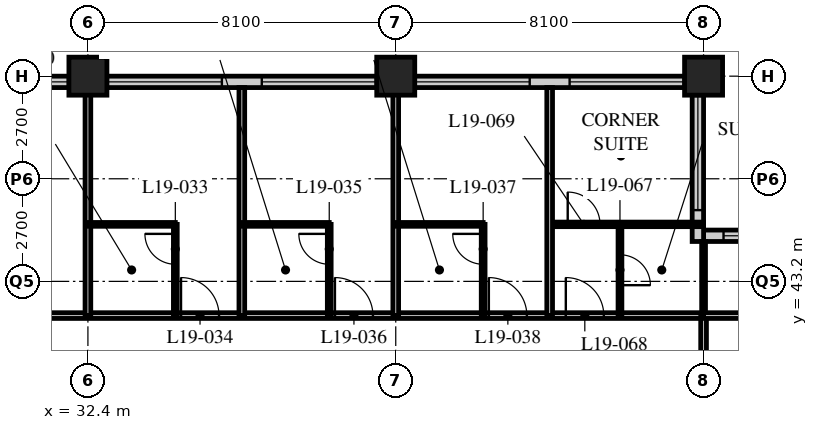
"""IFC4 building model, lengths in metres.
Left out: names, types, materials, properties, quantities, classifications, styles, units other than length and angle.
Written with IfcOpenShell. Run it as: python <this file> out.ifc"""

import sys

from ifc_helpers import new_model, si_unit, direction, frame, frame_2d, origin, origin_2d, place, context, subcontext, project, spatial, rectangle, hollow_rectangle, extrude, element, fill, save


model = new_model("IFC4")
c1 = context("Model", 3, precision=1e-05, world=origin(), true_north=direction((0.0, 1.0)))
c2 = subcontext(c1, "Body", "Model", "MODEL_VIEW")
j1 = project(units=[si_unit("LENGTHUNIT", "METRE"), si_unit("PLANEANGLEUNIT", "RADIAN")], contexts=[c1])
p1 = place(None, origin())
s1 = spatial("IfcSite", under=j1, at=p1, CompositionType="ELEMENT")
p2 = place(p1, origin())
s2 = spatial("IfcBuilding", under=s1, at=p2, CompositionType="ELEMENT")
p3 = place(p2, frame((0.0, 0.0, 77.2)))
s3 = spatial("IfcBuildingStorey", under=s2, at=p3, CompositionType="ELEMENT", Elevation=77.2)
for number, where, z_axis, x_axis in (
    (1, (32.4, 48.6, 0.0), (0.0, 0.0, 1.0), (1.0, 0.0, 0.0)),
    (2, (40.5, 48.6, 0.0), (0.0, 0.0, 1.0), (1.0, 0.0, 0.0)),
    (3, (48.6, 48.6, 0.0), (0.0, 0.0, 1.0), (1.0, 0.0, 0.0)),
):
    element("IfcColumn", number, at=place(p3, frame(where, z_axis=z_axis, x_axis=x_axis)), inside=s3, PredefinedType="COLUMN", context=c2, shape_type="SweptSolid", body=[
        extrude(hollow_rectangle(XDim=1.0, YDim=1.0, WallThickness=0.1, at=origin_2d()), origin(), (0.0, 0.0, 1.0), 3.4),
    ])
p4 = place(p3, frame((52.35, 44.4, 0.0), z_axis=(0.0, 0.0, 1.0), x_axis=(-1.0, 0.0, 0.0)))
e4 = element("IfcWall", 4, at=p4, inside=s3, PredefinedType="SOLIDWALL", context=c2, shape_type="SweptSolid", body=[
    extrude(rectangle(XDim=3.75, YDim=0.3, at=frame_2d((1.875, 0.0))), origin(), (0.0, 0.0, 1.0), 3.19),
])
p5 = place(p4, frame((0.225, 0.0, 0.9)))
e5 = element("IfcOpeningElement", 5, at=p5, cuts=e4, PredefinedType="OPENING", context=c2, shape_type="SweptSolid", body=[
    extrude(rectangle(XDim=3.0, YDim=1.5, at=frame_2d((1.5, 0.75))), frame((0.0, 0.16, 0.0), z_axis=(0.0, -1.0, 0.0), x_axis=(1.0, 0.0, 0.0)), (0.0, 0.0, 1.0), 0.32),
])
p6 = place(p3, frame((48.45, 44.25, 0.0), z_axis=(0.0, 0.0, 1.0), x_axis=(0.0, 1.0, 0.0)))
e6 = element("IfcWall", 6, at=p6, inside=s3, PredefinedType="SOLIDWALL", context=c2, shape_type="SweptSolid", body=[
    extrude(rectangle(XDim=4.35, YDim=0.3, at=frame_2d((2.175, 0.0))), origin(), (0.0, 0.0, 1.0), 3.19),
])
p7 = place(p6, frame((0.825, 0.0, 0.9)))
e7 = element("IfcOpeningElement", 7, at=p7, cuts=e6, PredefinedType="OPENING", context=c2, shape_type="SweptSolid", body=[
    extrude(rectangle(XDim=3.0, YDim=1.5, at=frame_2d((1.5, 0.75))), frame((0.0, 0.16, 0.0), z_axis=(0.0, -1.0, 0.0), x_axis=(1.0, 0.0, 0.0)), (0.0, 0.0, 1.0), 0.32),
])
p8 = place(p3, frame((48.3, 48.45, 0.0), z_axis=(0.0, 0.0, 1.0), x_axis=(-1.0, 0.0, 0.0)))
e8 = element("IfcWall", 8, at=p8, inside=s3, PredefinedType="SOLIDWALL", context=c2, shape_type="SweptSolid", body=[
    extrude(rectangle(XDim=40.2, YDim=0.3, at=frame_2d((20.1, 0.0))), origin(), (0.0, 0.0, 1.0), 3.19),
])
p9 = place(p8, frame((0.225, 0.0, 0.9)))
e9 = element("IfcOpeningElement", 9, at=p9, cuts=e8, PredefinedType="OPENING", context=c2, shape_type="SweptSolid", body=[
    extrude(rectangle(XDim=3.0, YDim=1.5, at=frame_2d((1.5, 0.75))), frame((0.0, 0.16, 0.0), z_axis=(0.0, -1.0, 0.0), x_axis=(1.0, 0.0, 0.0)), (0.0, 0.0, 1.0), 0.32),
])
p10 = place(p8, frame((4.275, 0.0, 0.9)))
e10 = element("IfcOpeningElement", 10, at=p10, cuts=e8, PredefinedType="OPENING", context=c2, shape_type="SweptSolid", body=[
    extrude(rectangle(XDim=3.0, YDim=1.5, at=frame_2d((1.5, 0.75))), frame((0.0, 0.16, 0.0), z_axis=(0.0, -1.0, 0.0), x_axis=(1.0, 0.0, 0.0)), (0.0, 0.0, 1.0), 0.32),
])
p11 = place(p8, frame((8.325, 0.0, 0.9)))
e11 = element("IfcOpeningElement", 11, at=p11, cuts=e8, PredefinedType="OPENING", context=c2, shape_type="SweptSolid", body=[
    extrude(rectangle(XDim=3.0, YDim=1.5, at=frame_2d((1.5, 0.75))), frame((0.0, 0.16, 0.0), z_axis=(0.0, -1.0, 0.0), x_axis=(1.0, 0.0, 0.0)), (0.0, 0.0, 1.0), 0.32),
])
p12 = place(p8, frame((12.375, 0.0, 0.9)))
e12 = element("IfcOpeningElement", 12, at=p12, cuts=e8, PredefinedType="OPENING", context=c2, shape_type="SweptSolid", body=[
    extrude(rectangle(XDim=3.0, YDim=1.5, at=frame_2d((1.5, 0.75))), frame((0.0, 0.16, 0.0), z_axis=(0.0, -1.0, 0.0), x_axis=(1.0, 0.0, 0.0)), (0.0, 0.0, 1.0), 0.32),
])
p13 = place(p8, frame((16.425, 0.0, 0.9)))
e13 = element("IfcOpeningElement", 13, at=p13, cuts=e8, PredefinedType="OPENING", context=c2, shape_type="SweptSolid", body=[
    extrude(rectangle(XDim=3.0, YDim=1.5, at=frame_2d((1.5, 0.75))), frame((0.0, 0.16, 0.0), z_axis=(0.0, -1.0, 0.0), x_axis=(1.0, 0.0, 0.0)), (0.0, 0.0, 1.0), 0.32),
])
p14 = place(p8, frame((20.475, 0.0, 0.9)))
e14 = element("IfcOpeningElement", 14, at=p14, cuts=e8, PredefinedType="OPENING", context=c2, shape_type="SweptSolid", body=[
    extrude(rectangle(XDim=3.0, YDim=1.5, at=frame_2d((1.5, 0.75))), frame((0.0, 0.16, 0.0), z_axis=(0.0, -1.0, 0.0), x_axis=(1.0, 0.0, 0.0)), (0.0, 0.0, 1.0), 0.32),
])
p15 = place(p8, frame((24.525, 0.0, 0.9)))
e15 = element("IfcOpeningElement", 15, at=p15, cuts=e8, PredefinedType="OPENING", context=c2, shape_type="SweptSolid", body=[
    extrude(rectangle(XDim=3.0, YDim=1.5, at=frame_2d((1.5, 0.75))), frame((0.0, 0.16, 0.0), z_axis=(0.0, -1.0, 0.0), x_axis=(1.0, 0.0, 0.0)), (0.0, 0.0, 1.0), 0.32),
])
p16 = place(p8, frame((28.575, 0.0, 0.9)))
e16 = element("IfcOpeningElement", 16, at=p16, cuts=e8, PredefinedType="OPENING", context=c2, shape_type="SweptSolid", body=[
    extrude(rectangle(XDim=3.0, YDim=1.5, at=frame_2d((1.5, 0.75))), frame((0.0, 0.16, 0.0), z_axis=(0.0, -1.0, 0.0), x_axis=(1.0, 0.0, 0.0)), (0.0, 0.0, 1.0), 0.32),
])
p17 = place(p8, frame((32.625, 0.0, 0.9)))
e17 = element("IfcOpeningElement", 17, at=p17, cuts=e8, PredefinedType="OPENING", context=c2, shape_type="SweptSolid", body=[
    extrude(rectangle(XDim=3.0, YDim=1.5, at=frame_2d((1.5, 0.75))), frame((0.0, 0.16, 0.0), z_axis=(0.0, -1.0, 0.0), x_axis=(1.0, 0.0, 0.0)), (0.0, 0.0, 1.0), 0.32),
])
p18 = place(p8, frame((36.675, 0.0, 0.9)))
e18 = element("IfcOpeningElement", 18, at=p18, cuts=e8, PredefinedType="OPENING", context=c2, shape_type="SweptSolid", body=[
    extrude(rectangle(XDim=3.0, YDim=1.5, at=frame_2d((1.5, 0.75))), frame((0.0, 0.16, 0.0), z_axis=(0.0, -1.0, 0.0), x_axis=(1.0, 0.0, 0.0)), (0.0, 0.0, 1.0), 0.32),
])
p19 = place(p3, frame((12.15, 42.3, 0.0), z_axis=(0.0, 0.0, 1.0), x_axis=(1.0, 0.0, 0.0)))
e19 = element("IfcWall", 19, at=p19, inside=s3, PredefinedType="PARTITIONING", context=c2, shape_type="SweptSolid", body=[
    extrude(rectangle(XDim=36.45, YDim=0.15, at=frame_2d((18.225, 0.0))), origin(), (0.0, 0.0, 1.0), 3.19),
])
p20 = place(p19, frame((9.5, 0.0, 0.0)))
e20 = element("IfcOpeningElement", 20, at=p20, cuts=e19, PredefinedType="OPENING", context=c2, shape_type="SweptSolid", body=[
    extrude(rectangle(XDim=1.0, YDim=2.1, at=frame_2d((0.5, 1.05))), frame((0.0, 0.085, 0.0), z_axis=(0.0, -1.0, 0.0), x_axis=(1.0, 0.0, 0.0)), (0.0, 0.0, 1.0), 0.17),
])
p21 = place(p19, frame((17.6, 0.0, 0.0)))
e21 = element("IfcOpeningElement", 21, at=p21, cuts=e19, PredefinedType="OPENING", context=c2, shape_type="SweptSolid", body=[
    extrude(rectangle(XDim=1.0, YDim=2.1, at=frame_2d((0.5, 1.05))), frame((0.0, 0.085, 0.0), z_axis=(0.0, -1.0, 0.0), x_axis=(1.0, 0.0, 0.0)), (0.0, 0.0, 1.0), 0.17),
])
p22 = place(p19, frame((22.7, 0.0, 0.0)))
e22 = element("IfcOpeningElement", 22, at=p22, cuts=e19, PredefinedType="OPENING", context=c2, shape_type="SweptSolid", body=[
    extrude(rectangle(XDim=1.0, YDim=2.1, at=frame_2d((0.5, 1.05))), frame((0.0, 0.085, 0.0), z_axis=(0.0, -1.0, 0.0), x_axis=(1.0, 0.0, 0.0)), (0.0, 0.0, 1.0), 0.17),
])
p23 = place(p19, frame((26.75, 0.0, 0.0)))
e23 = element("IfcOpeningElement", 23, at=p23, cuts=e19, PredefinedType="OPENING", context=c2, shape_type="SweptSolid", body=[
    extrude(rectangle(XDim=1.0, YDim=2.1, at=frame_2d((0.5, 1.05))), frame((0.0, 0.085, 0.0), z_axis=(0.0, -1.0, 0.0), x_axis=(1.0, 0.0, 0.0)), (0.0, 0.0, 1.0), 0.17),
])
p24 = place(p19, frame((30.8, 0.0, 0.0)))
e24 = element("IfcOpeningElement", 24, at=p24, cuts=e19, PredefinedType="OPENING", context=c2, shape_type="SweptSolid", body=[
    extrude(rectangle(XDim=1.0, YDim=2.1, at=frame_2d((0.5, 1.05))), frame((0.0, 0.085, 0.0), z_axis=(0.0, -1.0, 0.0), x_axis=(1.0, 0.0, 0.0)), (0.0, 0.0, 1.0), 0.17),
])
p25 = place(p19, frame((32.825, 0.0, 0.0)))
e25 = element("IfcOpeningElement", 25, at=p25, cuts=e19, PredefinedType="OPENING", context=c2, shape_type="SweptSolid", body=[
    extrude(rectangle(XDim=1.0, YDim=2.1, at=frame_2d((0.5, 1.05))), frame((0.0, 0.085, 0.0), z_axis=(0.0, -1.0, 0.0), x_axis=(1.0, 0.0, 0.0)), (0.0, 0.0, 1.0), 0.17),
])
p26 = place(p19, frame((2.625, 0.0, 0.0)))
e26 = element("IfcOpeningElement", 26, at=p26, cuts=e19, PredefinedType="OPENING", context=c2, shape_type="SweptSolid", body=[
    extrude(rectangle(XDim=1.0, YDim=2.1, at=frame_2d((0.5, 1.05))), frame((0.0, 0.085, 0.0), z_axis=(0.0, -1.0, 0.0), x_axis=(1.0, 0.0, 0.0)), (0.0, 0.0, 1.0), 0.17),
])
p27 = place(p3, frame((48.6, 16.2, 0.0), z_axis=(0.0, 0.0, 1.0), x_axis=(0.0, 1.0, 0.0)))
e27 = element("IfcWall", 27, at=p27, inside=s3, PredefinedType="PARTITIONING", context=c2, shape_type="SweptSolid", body=[
    extrude(rectangle(XDim=26.1, YDim=0.15, at=frame_2d((13.05, 0.0))), origin(), (0.0, 0.0, 1.0), 2.428),
])
p28 = place(p27, frame((2.75, 0.0, 0.0)))
e28 = element("IfcOpeningElement", 28, at=p28, cuts=e27, PredefinedType="OPENING", context=c2, shape_type="SweptSolid", body=[
    extrude(rectangle(XDim=1.0, YDim=2.1, at=frame_2d((0.5, 1.05))), frame((0.0, 0.085, 0.0), z_axis=(0.0, -1.0, 0.0), x_axis=(1.0, 0.0, 0.0)), (0.0, 0.0, 1.0), 0.17),
])
p29 = place(p27, frame((4.65, 0.0, 0.0)))
e29 = element("IfcOpeningElement", 29, at=p29, cuts=e27, PredefinedType="OPENING", context=c2, shape_type="SweptSolid", body=[
    extrude(rectangle(XDim=1.0, YDim=2.1, at=frame_2d((0.5, 1.05))), frame((0.0, 0.085, 0.0), z_axis=(0.0, -1.0, 0.0), x_axis=(1.0, 0.0, 0.0)), (0.0, 0.0, 1.0), 0.17),
])
p30 = place(p27, frame((13.55, 0.0, 0.0)))
e30 = element("IfcOpeningElement", 30, at=p30, cuts=e27, PredefinedType="OPENING", context=c2, shape_type="SweptSolid", body=[
    extrude(rectangle(XDim=1.0, YDim=2.1, at=frame_2d((0.5, 1.05))), frame((0.0, 0.085, 0.0), z_axis=(0.0, -1.0, 0.0), x_axis=(1.0, 0.0, 0.0)), (0.0, 0.0, 1.0), 0.17),
])
p31 = place(p27, frame((21.65, 0.0, 0.0)))
e31 = element("IfcOpeningElement", 31, at=p31, cuts=e27, PredefinedType="OPENING", context=c2, shape_type="SweptSolid", body=[
    extrude(rectangle(XDim=1.0, YDim=2.1, at=frame_2d((0.5, 1.05))), frame((0.0, 0.085, 0.0), z_axis=(0.0, -1.0, 0.0), x_axis=(1.0, 0.0, 0.0)), (0.0, 0.0, 1.0), 0.17),
])
p32 = place(p3, frame((32.4, 42.3, 0.0), z_axis=(0.0, 0.0, 1.0), x_axis=(0.0, 1.0, 0.0)))
e32 = element("IfcWall", 32, at=p32, inside=s3, PredefinedType="PARTITIONING", context=c2, shape_type="SweptSolid", body=[
    extrude(rectangle(XDim=6.0, YDim=0.15, at=frame_2d((3.0, 0.0))), origin(), (0.0, 0.0, 1.0), 2.428),
])
p33 = place(p3, frame((32.4, 44.7, 0.0), z_axis=(0.0, 0.0, 1.0), x_axis=(1.0, 0.0, 0.0)))
e33 = element("IfcWall", 33, at=p33, inside=s3, PredefinedType="PARTITIONING", context=c2, shape_type="SweptSolid", body=[
    extrude(rectangle(XDim=2.3, YDim=0.1, at=frame_2d((1.15, 0.0))), origin(), (0.0, 0.0, 1.0), 3.19),
])
p34 = place(p3, frame((34.7, 42.3, 0.0), z_axis=(0.0, 0.0, 1.0), x_axis=(0.0, 1.0, 0.0)))
e34 = element("IfcWall", 34, at=p34, inside=s3, PredefinedType="PARTITIONING", context=c2, shape_type="SweptSolid", body=[
    extrude(rectangle(XDim=2.4, YDim=0.1, at=frame_2d((1.2, 0.0))), origin(), (0.0, 0.0, 1.0), 3.19),
])
p35 = place(p34, frame((1.35, 0.0, 0.0)))
e35 = element("IfcOpeningElement", 35, at=p35, cuts=e34, PredefinedType="OPENING", context=c2, shape_type="SweptSolid", body=[
    extrude(rectangle(XDim=0.8, YDim=2.1, at=frame_2d((0.4, 1.05))), frame((0.0, 0.06, 0.0), z_axis=(0.0, -1.0, 0.0), x_axis=(1.0, 0.0, 0.0)), (0.0, 0.0, 1.0), 0.12),
])
p36 = place(p3, frame((36.45, 42.3, 0.0), z_axis=(0.0, 0.0, 1.0), x_axis=(0.0, 1.0, 0.0)))
e36 = element("IfcWall", 36, at=p36, inside=s3, PredefinedType="PARTITIONING", context=c2, shape_type="SweptSolid", body=[
    extrude(rectangle(XDim=6.0, YDim=0.15, at=frame_2d((3.0, 0.0))), origin(), (0.0, 0.0, 1.0), 3.19),
])
p37 = place(p3, frame((36.45, 44.7, 0.0), z_axis=(0.0, 0.0, 1.0), x_axis=(1.0, 0.0, 0.0)))
e37 = element("IfcWall", 37, at=p37, inside=s3, PredefinedType="PARTITIONING", context=c2, shape_type="SweptSolid", body=[
    extrude(rectangle(XDim=2.3, YDim=0.1, at=frame_2d((1.15, 0.0))), origin(), (0.0, 0.0, 1.0), 3.19),
])
p38 = place(p3, frame((38.75, 42.3, 0.0), z_axis=(0.0, 0.0, 1.0), x_axis=(0.0, 1.0, 0.0)))
e38 = element("IfcWall", 38, at=p38, inside=s3, PredefinedType="PARTITIONING", context=c2, shape_type="SweptSolid", body=[
    extrude(rectangle(XDim=2.4, YDim=0.1, at=frame_2d((1.2, 0.0))), origin(), (0.0, 0.0, 1.0), 3.19),
])
p39 = place(p38, frame((1.35, 0.0, 0.0)))
e39 = element("IfcOpeningElement", 39, at=p39, cuts=e38, PredefinedType="OPENING", context=c2, shape_type="SweptSolid", body=[
    extrude(rectangle(XDim=0.8, YDim=2.1, at=frame_2d((0.4, 1.05))), frame((0.0, 0.06, 0.0), z_axis=(0.0, -1.0, 0.0), x_axis=(1.0, 0.0, 0.0)), (0.0, 0.0, 1.0), 0.12),
])
p40 = place(p3, frame((40.5, 42.3, 0.0), z_axis=(0.0, 0.0, 1.0), x_axis=(0.0, 1.0, 0.0)))
e40 = element("IfcWall", 40, at=p40, inside=s3, PredefinedType="PARTITIONING", context=c2, shape_type="SweptSolid", body=[
    extrude(rectangle(XDim=6.0, YDim=0.15, at=frame_2d((3.0, 0.0))), origin(), (0.0, 0.0, 1.0), 2.428),
])
p41 = place(p3, frame((40.5, 44.7, 0.0), z_axis=(0.0, 0.0, 1.0), x_axis=(1.0, 0.0, 0.0)))
e41 = element("IfcWall", 41, at=p41, inside=s3, PredefinedType="PARTITIONING", context=c2, shape_type="SweptSolid", body=[
    extrude(rectangle(XDim=2.3, YDim=0.1, at=frame_2d((1.15, 0.0))), origin(), (0.0, 0.0, 1.0), 3.19),
])
p42 = place(p3, frame((42.8, 42.3, 0.0), z_axis=(0.0, 0.0, 1.0), x_axis=(0.0, 1.0, 0.0)))
e42 = element("IfcWall", 42, at=p42, inside=s3, PredefinedType="PARTITIONING", context=c2, shape_type="SweptSolid", body=[
    extrude(rectangle(XDim=2.4, YDim=0.1, at=frame_2d((1.2, 0.0))), origin(), (0.0, 0.0, 1.0), 3.19),
])
p43 = place(p42, frame((1.35, 0.0, 0.0)))
e43 = element("IfcOpeningElement", 43, at=p43, cuts=e42, PredefinedType="OPENING", context=c2, shape_type="SweptSolid", body=[
    extrude(rectangle(XDim=0.8, YDim=2.1, at=frame_2d((0.4, 1.05))), frame((0.0, 0.06, 0.0), z_axis=(0.0, -1.0, 0.0), x_axis=(1.0, 0.0, 0.0)), (0.0, 0.0, 1.0), 0.12),
])
p44 = place(p3, frame((44.55, 44.7, 0.0), z_axis=(0.0, 0.0, 1.0), x_axis=(1.0, 0.0, 0.0)))
e44 = element("IfcWall", 44, at=p44, inside=s3, PredefinedType="PARTITIONING", context=c2, shape_type="SweptSolid", body=[
    extrude(rectangle(XDim=4.05, YDim=0.12, at=frame_2d((2.025, 0.0))), origin(), (0.0, 0.0, 1.0), 3.19),
])
p45 = place(p44, frame((0.475, 0.0, 0.0)))
e45 = element("IfcOpeningElement", 45, at=p45, cuts=e44, PredefinedType="OPENING", context=c2, shape_type="SweptSolid", body=[
    extrude(rectangle(XDim=0.85, YDim=2.1, at=frame_2d((0.425, 1.05))), frame((0.0, 0.07, 0.0), z_axis=(0.0, -1.0, 0.0), x_axis=(1.0, 0.0, 0.0)), (0.0, 0.0, 1.0), 0.14),
])
p46 = place(p3, frame((46.4, 42.3, 0.0), z_axis=(0.0, 0.0, 1.0), x_axis=(0.0, 1.0, 0.0)))
e46 = element("IfcWall", 46, at=p46, inside=s3, PredefinedType="PARTITIONING", context=c2, shape_type="SweptSolid", body=[
    extrude(rectangle(XDim=2.4, YDim=0.1, at=frame_2d((1.2, 0.0))), origin(), (0.0, 0.0, 1.0), 3.19),
])
p47 = place(p46, frame((0.8, 0.0, 0.0)))
e47 = element("IfcOpeningElement", 47, at=p47, cuts=e46, PredefinedType="OPENING", context=c2, shape_type="SweptSolid", body=[
    extrude(rectangle(XDim=0.8, YDim=2.1, at=frame_2d((0.4, 1.05))), frame((0.0, 0.06, 0.0), z_axis=(0.0, -1.0, 0.0), x_axis=(1.0, 0.0, 0.0)), (0.0, 0.0, 1.0), 0.12),
])
p48 = place(p3, frame((48.6, 42.3, 0.0), z_axis=(0.0, 0.0, 1.0), x_axis=(0.0, 1.0, 0.0)))
e48 = element("IfcWall", 48, at=p48, inside=s3, PredefinedType="PARTITIONING", context=c2, shape_type="SweptSolid", body=[
    extrude(rectangle(XDim=1.95, YDim=0.1, at=frame_2d((0.975, 0.0))), origin(), (0.0, 0.0, 1.0), 2.428),
])
p49 = place(p3, frame((48.6, 42.3, 0.0), z_axis=(0.0, 0.0, 1.0), x_axis=(1.0, 0.0, 0.0)))
e49 = element("IfcWall", 49, at=p49, inside=s3, PredefinedType="PARTITIONING", context=c2, shape_type="SweptSolid", body=[
    extrude(rectangle(XDim=3.75, YDim=0.15, at=frame_2d((1.875, 0.0))), origin(), (0.0, 0.0, 1.0), 3.19),
])
p50 = place(p3, frame((44.55, 42.3, 0.0), z_axis=(0.0, 0.0, 1.0), x_axis=(0.0, 1.0, 0.0)))
e50 = element("IfcWall", 50, at=p50, inside=s3, PredefinedType="PARTITIONING", context=c2, shape_type="SweptSolid", body=[
    extrude(rectangle(XDim=6.0, YDim=0.15, at=frame_2d((3.0, 0.0))), origin(), (0.0, 0.0, 1.0), 3.19),
])
p51 = place(p5, origin())
e51 = element("IfcWindow", 51, at=p51, inside=s3, PartitioningType="SINGLE_PANEL", PredefinedType="WINDOW", context=c2, shape_type="SweptSolid", body=[
    extrude(rectangle(XDim=3.0, YDim=1.5, at=frame_2d((1.5, 0.75))), frame((0.0, 0.03, 0.0), z_axis=(0.0, -1.0, 0.0), x_axis=(1.0, 0.0, 0.0)), (0.0, 0.0, 1.0), 0.06),
])
fill(e5, e51)
p52 = place(p7, origin())
e52 = element("IfcWindow", 52, at=p52, inside=s3, PartitioningType="SINGLE_PANEL", PredefinedType="WINDOW", context=c2, shape_type="SweptSolid", body=[
    extrude(rectangle(XDim=3.0, YDim=1.5, at=frame_2d((1.5, 0.75))), frame((0.0, 0.03, 0.0), z_axis=(0.0, -1.0, 0.0), x_axis=(1.0, 0.0, 0.0)), (0.0, 0.0, 1.0), 0.06),
])
fill(e7, e52)
p53 = place(p9, origin())
e53 = element("IfcWindow", 53, at=p53, inside=s3, PartitioningType="SINGLE_PANEL", PredefinedType="WINDOW", context=c2, shape_type="SweptSolid", body=[
    extrude(rectangle(XDim=3.0, YDim=1.5, at=frame_2d((1.5, 0.75))), frame((0.0, 0.03, 0.0), z_axis=(0.0, -1.0, 0.0), x_axis=(1.0, 0.0, 0.0)), (0.0, 0.0, 1.0), 0.06),
])
fill(e9, e53)
p54 = place(p10, origin())
e54 = element("IfcWindow", 54, at=p54, inside=s3, PartitioningType="SINGLE_PANEL", PredefinedType="WINDOW", context=c2, shape_type="SweptSolid", body=[
    extrude(rectangle(XDim=3.0, YDim=1.5, at=frame_2d((1.5, 0.75))), frame((0.0, 0.03, 0.0), z_axis=(0.0, -1.0, 0.0), x_axis=(1.0, 0.0, 0.0)), (0.0, 0.0, 1.0), 0.06),
])
fill(e10, e54)
p55 = place(p11, origin())
e55 = element("IfcWindow", 55, at=p55, inside=s3, PartitioningType="SINGLE_PANEL", PredefinedType="WINDOW", context=c2, shape_type="SweptSolid", body=[
    extrude(rectangle(XDim=3.0, YDim=1.5, at=frame_2d((1.5, 0.75))), frame((0.0, 0.03, 0.0), z_axis=(0.0, -1.0, 0.0), x_axis=(1.0, 0.0, 0.0)), (0.0, 0.0, 1.0), 0.06),
])
fill(e11, e55)
p56 = place(p12, origin())
e56 = element("IfcWindow", 56, at=p56, inside=s3, PartitioningType="SINGLE_PANEL", PredefinedType="WINDOW", context=c2, shape_type="SweptSolid", body=[
    extrude(rectangle(XDim=3.0, YDim=1.5, at=frame_2d((1.5, 0.75))), frame((0.0, 0.03, 0.0), z_axis=(0.0, -1.0, 0.0), x_axis=(1.0, 0.0, 0.0)), (0.0, 0.0, 1.0), 0.06),
])
fill(e12, e56)
p57 = place(p13, origin())
e57 = element("IfcWindow", 57, at=p57, inside=s3, PartitioningType="SINGLE_PANEL", PredefinedType="WINDOW", context=c2, shape_type="SweptSolid", body=[
    extrude(rectangle(XDim=3.0, YDim=1.5, at=frame_2d((1.5, 0.75))), frame((0.0, 0.03, 0.0), z_axis=(0.0, -1.0, 0.0), x_axis=(1.0, 0.0, 0.0)), (0.0, 0.0, 1.0), 0.06),
])
fill(e13, e57)
p58 = place(p35, origin())
e58 = element("IfcDoor", 58, at=p58, inside=s3, OperationType="SINGLE_SWING_RIGHT", PredefinedType="DOOR", context=c2, shape_type="SweptSolid", body=[
    extrude(rectangle(XDim=0.8, YDim=2.1, at=frame_2d((0.4, 1.05))), frame((0.0, 0.025, 0.0), z_axis=(0.0, -1.0, 0.0), x_axis=(1.0, 0.0, 0.0)), (0.0, 0.0, 1.0), 0.05),
])
fill(e35, e58)
p59 = place(p22, origin())
e59 = element("IfcDoor", 59, at=p59, inside=s3, OperationType="SINGLE_SWING_LEFT", PredefinedType="DOOR", context=c2, shape_type="SweptSolid", body=[
    extrude(rectangle(XDim=1.0, YDim=2.1, at=frame_2d((0.5, 1.05))), frame((0.0, 0.025, 0.0), z_axis=(0.0, -1.0, 0.0), x_axis=(1.0, 0.0, 0.0)), (0.0, 0.0, 1.0), 0.05),
])
fill(e22, e59)
p60 = place(p39, origin())
e60 = element("IfcDoor", 60, at=p60, inside=s3, OperationType="SINGLE_SWING_RIGHT", PredefinedType="DOOR", context=c2, shape_type="SweptSolid", body=[
    extrude(rectangle(XDim=0.8, YDim=2.1, at=frame_2d((0.4, 1.05))), frame((0.0, 0.025, 0.0), z_axis=(0.0, -1.0, 0.0), x_axis=(1.0, 0.0, 0.0)), (0.0, 0.0, 1.0), 0.05),
])
fill(e39, e60)
p61 = place(p23, origin())
e61 = element("IfcDoor", 61, at=p61, inside=s3, OperationType="SINGLE_SWING_LEFT", PredefinedType="DOOR", context=c2, shape_type="SweptSolid", body=[
    extrude(rectangle(XDim=1.0, YDim=2.1, at=frame_2d((0.5, 1.05))), frame((0.0, 0.025, 0.0), z_axis=(0.0, -1.0, 0.0), x_axis=(1.0, 0.0, 0.0)), (0.0, 0.0, 1.0), 0.05),
])
fill(e23, e61)
p62 = place(p43, origin())
e62 = element("IfcDoor", 62, at=p62, inside=s3, OperationType="SINGLE_SWING_RIGHT", PredefinedType="DOOR", context=c2, shape_type="SweptSolid", body=[
    extrude(rectangle(XDim=0.8, YDim=2.1, at=frame_2d((0.4, 1.05))), frame((0.0, 0.025, 0.0), z_axis=(0.0, -1.0, 0.0), x_axis=(1.0, 0.0, 0.0)), (0.0, 0.0, 1.0), 0.05),
])
fill(e43, e62)
p63 = place(p24, origin())
e63 = element("IfcDoor", 63, at=p63, inside=s3, OperationType="SINGLE_SWING_LEFT", PredefinedType="DOOR", context=c2, shape_type="SweptSolid", body=[
    extrude(rectangle(XDim=1.0, YDim=2.1, at=frame_2d((0.5, 1.05))), frame((0.0, 0.025, 0.0), z_axis=(0.0, -1.0, 0.0), x_axis=(1.0, 0.0, 0.0)), (0.0, 0.0, 1.0), 0.05),
])
fill(e24, e63)
p64 = place(p47, origin())
e64 = element("IfcDoor", 64, at=p64, inside=s3, OperationType="SINGLE_SWING_RIGHT", PredefinedType="DOOR", context=c2, shape_type="SweptSolid", body=[
    extrude(rectangle(XDim=0.8, YDim=2.1, at=frame_2d((0.4, 1.05))), frame((0.0, 0.025, 0.0), z_axis=(0.0, -1.0, 0.0), x_axis=(1.0, 0.0, 0.0)), (0.0, 0.0, 1.0), 0.05),
])
fill(e47, e64)
p65 = place(p25, origin())
e65 = element("IfcDoor", 65, at=p65, inside=s3, OperationType="SINGLE_SWING_LEFT", PredefinedType="DOOR", context=c2, shape_type="SweptSolid", body=[
    extrude(rectangle(XDim=1.0, YDim=2.1, at=frame_2d((0.5, 1.05))), frame((0.0, 0.025, 0.0), z_axis=(0.0, -1.0, 0.0), x_axis=(1.0, 0.0, 0.0)), (0.0, 0.0, 1.0), 0.05),
])
fill(e25, e65)
p66 = place(p45, origin())
e66 = element("IfcDoor", 66, at=p66, inside=s3, OperationType="SINGLE_SWING_LEFT", PredefinedType="DOOR", context=c2, shape_type="SweptSolid", body=[
    extrude(rectangle(XDim=0.85, YDim=2.1, at=frame_2d((0.425, 1.05))), frame((0.0, 0.025, 0.0), z_axis=(0.0, -1.0, 0.0), x_axis=(1.0, 0.0, 0.0)), (0.0, 0.0, 1.0), 0.05),
])
fill(e45, e66)
save(model, sys.argv[1])
